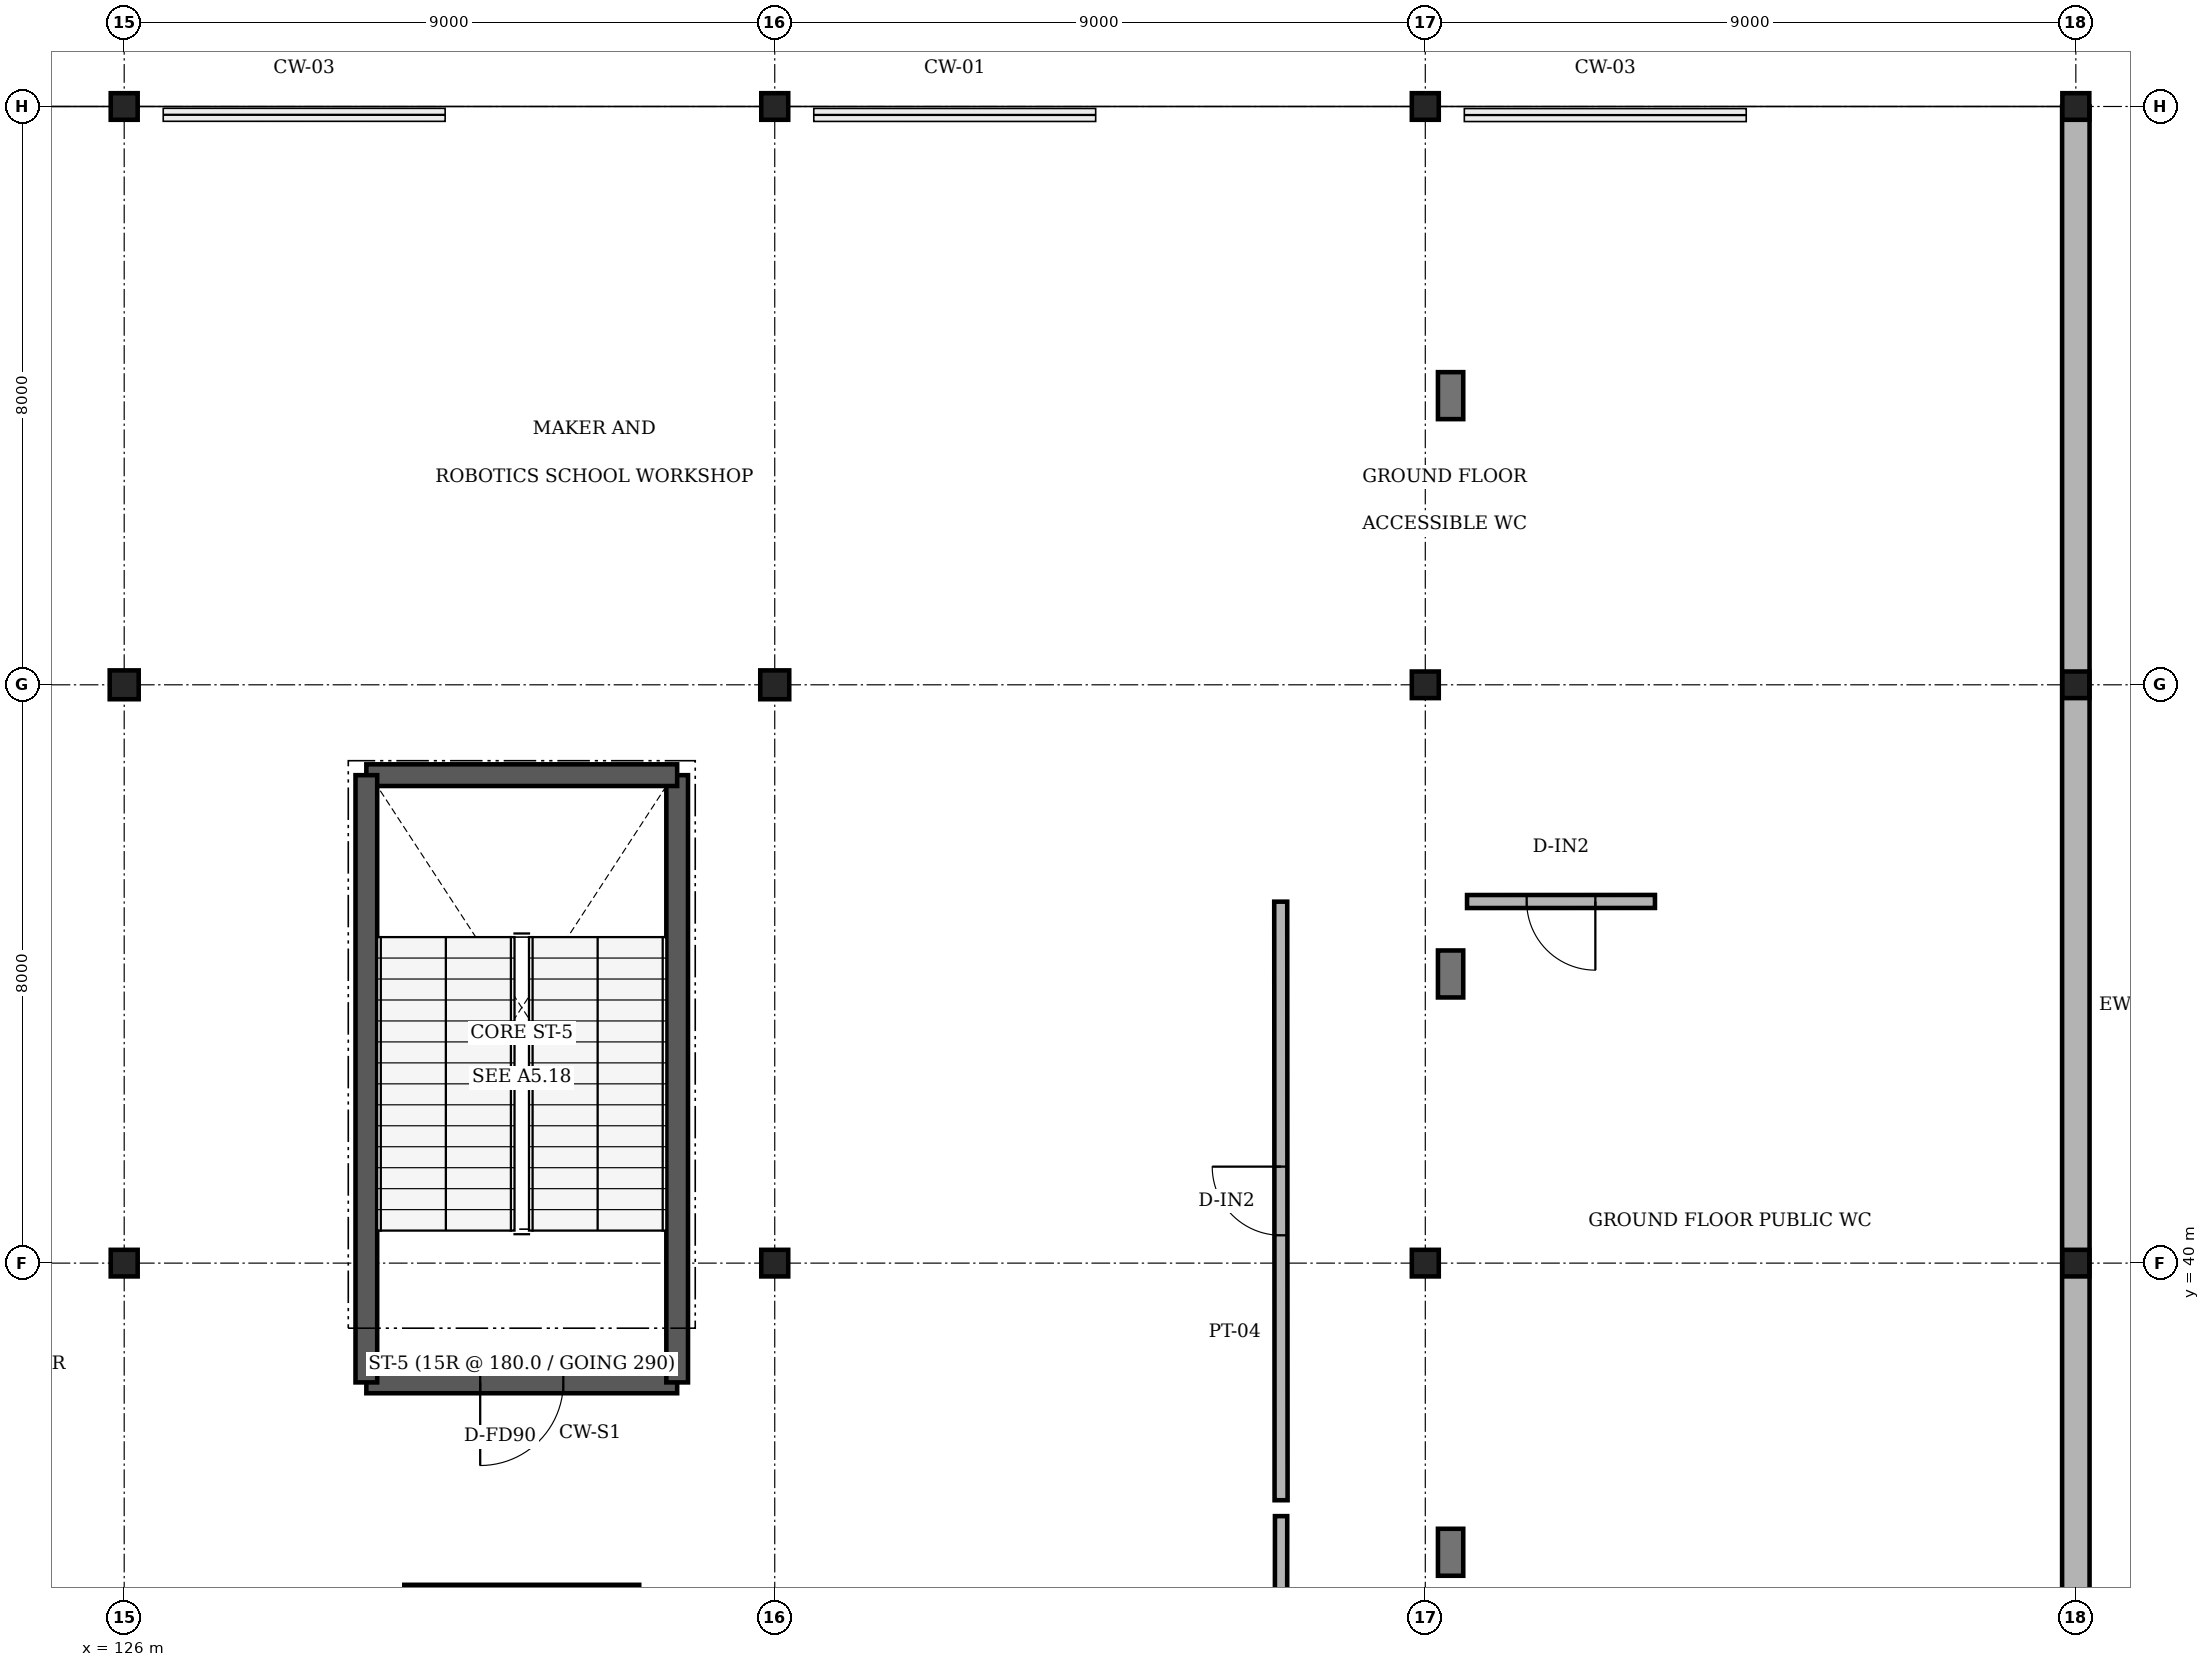
"""IFC4 building model, lengths in metres.
Left out: names, types, materials, properties, quantities, classifications, styles, units other than length and angle.
Written with IfcOpenShell. Run it as: python <this file> out.ifc"""

import sys

from ifc_helpers import new_model, si_unit, direction, frame, frame_2d, origin, origin_2d, place, context, subcontext, project, spatial, rectangle, i_section, extrude, element, fill, save


model = new_model("IFC4")
c1 = context("Model", 3, precision=1e-05, world=origin(), true_north=direction((0.0, 1.0)))
c2 = subcontext(c1, "Body", "Model", "MODEL_VIEW")
j1 = project(units=[si_unit("LENGTHUNIT", "METRE"), si_unit("PLANEANGLEUNIT", "RADIAN")], contexts=[c1])
p1 = place(None, origin())
s1 = spatial("IfcSite", under=j1, at=p1, CompositionType="ELEMENT")
p2 = place(p1, origin())
s2 = spatial("IfcBuilding", under=s1, at=p2, CompositionType="ELEMENT")
p3 = place(p2, origin())
s3 = spatial("IfcBuildingStorey", under=s2, at=p3, CompositionType="ELEMENT", Elevation=0.0)
p4 = place(p3, frame((126.0, 40.0, 0.0), z_axis=(0.0, 0.0, 1.0), x_axis=(1.0, 0.0, 0.0)))
e1 = element("IfcColumn", 1, at=p4, inside=s3, PredefinedType="COLUMN", context=c2, shape_type="SweptSolid", body=[
    extrude(i_section(OverallWidth=0.373, OverallDepth=0.368, WebThickness=0.015, FlangeThickness=0.024, FilletRadius=0.015, at=origin_2d()), origin(), (0.0, 0.0, 1.0), 5.4),
])
p5 = place(p3, frame((126.0, 48.0, 0.0), z_axis=(0.0, 0.0, 1.0), x_axis=(1.0, 0.0, 0.0)))
e2 = element("IfcColumn", 2, at=p5, inside=s3, PredefinedType="COLUMN", context=c2, shape_type="SweptSolid", body=[
    extrude(i_section(OverallWidth=0.401, OverallDepth=0.399, WebThickness=0.025, FlangeThickness=0.04, FilletRadius=0.015, at=origin_2d()), origin(), (0.0, 0.0, 1.0), 5.4),
])
for number, where, z_axis, x_axis in (
    (3, (126.0, 56.0, 0.0), (0.0, 0.0, 1.0), (1.0, 0.0, 0.0)),
    (4, (135.0, 40.0, 0.0), (0.0, 0.0, 1.0), (1.0, 0.0, 0.0)),
):
    element("IfcColumn", number, at=place(p3, frame(where, z_axis=z_axis, x_axis=x_axis)), inside=s3, PredefinedType="COLUMN", context=c2, shape_type="SweptSolid", body=[
        extrude(i_section(OverallWidth=0.373, OverallDepth=0.368, WebThickness=0.015, FlangeThickness=0.024, FilletRadius=0.015, at=origin_2d()), origin(), (0.0, 0.0, 1.0), 5.4),
    ])
p6 = place(p3, frame((135.0, 48.0, 0.0), z_axis=(0.0, 0.0, 1.0), x_axis=(1.0, 0.0, 0.0)))
e5 = element("IfcColumn", 5, at=p6, inside=s3, PredefinedType="COLUMN", context=c2, shape_type="SweptSolid", body=[
    extrude(i_section(OverallWidth=0.401, OverallDepth=0.399, WebThickness=0.025, FlangeThickness=0.04, FilletRadius=0.015, at=origin_2d()), origin(), (0.0, 0.0, 1.0), 5.4),
])
for number, where, z_axis, x_axis in (
    (6, (135.0, 56.0, 0.0), (0.0, 0.0, 1.0), (1.0, 0.0, 0.0)),
    (7, (144.0, 40.0, 0.0), (0.0, 0.0, 1.0), (1.0, 0.0, 0.0)),
    (8, (144.0, 48.0, 0.0), (0.0, 0.0, 1.0), (1.0, 0.0, 0.0)),
    (9, (144.0, 56.0, 0.0), (0.0, 0.0, 1.0), (1.0, 0.0, 0.0)),
    (10, (153.0, 40.0, 0.0), (0.0, 0.0, 1.0), (1.0, 0.0, 0.0)),
    (11, (153.0, 48.0, 0.0), (0.0, 0.0, 1.0), (1.0, 0.0, 0.0)),
    (12, (153.0, 56.0, 0.0), (0.0, 0.0, 1.0), (1.0, 0.0, 0.0)),
):
    element("IfcColumn", number, at=place(p3, frame(where, z_axis=z_axis, x_axis=x_axis)), inside=s3, PredefinedType="COLUMN", context=c2, shape_type="SweptSolid", body=[
        extrude(i_section(OverallWidth=0.373, OverallDepth=0.368, WebThickness=0.015, FlangeThickness=0.024, FilletRadius=0.015, at=origin_2d()), origin(), (0.0, 0.0, 1.0), 5.4),
    ])
for number, where, z_axis, x_axis in (
    (13, (144.35, 36.0, 0.0), (0.0, 0.0, 1.0), (0.0, 1.0, 0.0)),
    (14, (144.35, 44.0, 0.0), (0.0, 0.0, 1.0), (0.0, 1.0, 0.0)),
    (15, (144.35, 52.0, 0.0), (0.0, 0.0, 1.0), (0.0, 1.0, 0.0)),
):
    element("IfcColumn", number, at=place(p3, frame(where, z_axis=z_axis, x_axis=x_axis)), inside=s3, PredefinedType="PILASTER", context=c2, shape_type="SweptSolid", body=[
        extrude(rectangle(XDim=0.65, YDim=0.35, at=origin_2d()), origin(), (0.0, 0.0, 1.0), 5.4),
    ])
p7 = place(p3, frame((153.0, 56.0, 0.0), z_axis=(0.0, 0.0, 1.0), x_axis=(0.0, -1.0, 0.0)))
e16 = element("IfcWall", 16, at=p7, inside=s3, PredefinedType="SOLIDWALL", context=c2, shape_type="SweptSolid", body=[
    extrude(rectangle(XDim=44.4, YDim=0.38, at=frame_2d((22.2, 0.0))), origin(), (0.0, 0.0, 1.0), 4.166),
])
p8 = place(p7, frame((21.2, 0.0, 0.0)))
e17 = element("IfcOpeningElement", 17, at=p8, cuts=e16, PredefinedType="OPENING", context=c2, shape_type="SweptSolid", body=[
    extrude(rectangle(XDim=2.0, YDim=2.4, at=frame_2d((1.0, 1.2))), frame((0.0, 0.2, 0.0), z_axis=(0.0, -1.0, 0.0), x_axis=(1.0, 0.0, 0.0)), (0.0, 0.0, 1.0), 0.4),
])
p9 = place(p3, frame((133.65, 38.35, 0.0), z_axis=(0.0, 0.0, 1.0), x_axis=(-1.0, 0.0, 0.0)))
e18 = element("IfcWall", 18, at=p9, inside=s3, PredefinedType="SOLIDWALL", context=c2, shape_type="SweptSolid", body=[
    extrude(rectangle(XDim=4.3, YDim=0.3, at=frame_2d((2.15, 0.0))), origin(), (0.0, 0.0, 1.0), 5.4),
])
p10 = place(p9, frame((1.575, 0.0, 0.0)))
e19 = element("IfcOpeningElement", 19, at=p10, cuts=e18, PredefinedType="OPENING", context=c2, shape_type="SweptSolid", body=[
    extrude(rectangle(XDim=1.15, YDim=2.2, at=frame_2d((0.575, 1.1))), frame((0.0, 0.16, 0.0), z_axis=(0.0, -1.0, 0.0), x_axis=(1.0, 0.0, 0.0)), (0.0, 0.0, 1.0), 0.32),
])
p11 = place(p3, frame((133.65, 38.35, 0.0), z_axis=(0.0, 0.0, 1.0), x_axis=(0.0, 1.0, 0.0)))
e20 = element("IfcWall", 20, at=p11, inside=s3, PredefinedType="SOLIDWALL", context=c2, shape_type="SweptSolid", body=[
    extrude(rectangle(XDim=8.4, YDim=0.3, at=frame_2d((4.2, 0.0))), origin(), (0.0, 0.0, 1.0), 5.4),
])
p12 = place(p3, frame((133.65, 46.75, 0.0), z_axis=(0.0, 0.0, 1.0), x_axis=(-1.0, 0.0, 0.0)))
e21 = element("IfcWall", 21, at=p12, inside=s3, PredefinedType="SOLIDWALL", context=c2, shape_type="SweptSolid", body=[
    extrude(rectangle(XDim=4.3, YDim=0.3, at=frame_2d((2.15, 0.0))), origin(), (0.0, 0.0, 1.0), 5.4),
])
p13 = place(p3, frame((129.35, 38.35, 0.0), z_axis=(0.0, 0.0, 1.0), x_axis=(0.0, 1.0, 0.0)))
e22 = element("IfcWall", 22, at=p13, inside=s3, PredefinedType="SOLIDWALL", context=c2, shape_type="SweptSolid", body=[
    extrude(rectangle(XDim=8.4, YDim=0.3, at=frame_2d((4.2, 0.0))), origin(), (0.0, 0.0, 1.0), 5.4),
])
p14 = place(p3, frame((133.125, 35.425, 0.0), z_axis=(0.0, 0.0, 1.0), x_axis=(-1.0, 0.0, 0.0)))
e23 = element("IfcWall", 23, at=p14, inside=s3, PredefinedType="SOLIDWALL", context=c2, shape_type="SweptSolid", body=[
    extrude(rectangle(XDim=3.25, YDim=0.25, at=frame_2d((1.625, 0.0))), origin(), (0.0, 0.0, 1.0), 5.4),
])
p15 = place(p3, frame((142.0, 26.005, 0.0), z_axis=(0.0, 0.0, 1.0), x_axis=(0.000465246065, 0.999999891773, 0.0)))
e24 = element("IfcWall", 24, at=p15, inside=s3, PredefinedType="PARTITIONING", context=c2, shape_type="SweptSolid", body=[
    extrude(rectangle(XDim=10.495, YDim=0.17, at=frame_2d((5.248, 0.0))), origin(), (0.0, 0.0, 1.0), 3.15),
])
p16 = place(p15, frame((6.856, 0.0, 0.0)))
e25 = element("IfcOpeningElement", 25, at=p16, cuts=e24, PredefinedType="OPENING", context=c2, shape_type="SweptSolid", body=[
    extrude(rectangle(XDim=1.4, YDim=2.25, at=frame_2d((0.7, 1.125))), frame((0.0, 0.095, 0.0), z_axis=(0.0, -1.0, 0.0), x_axis=(1.0, 0.0, 0.0)), (0.0, 0.0, 1.0), 0.19),
])
p17 = place(p3, frame((142.005, 36.72, 0.0), z_axis=(0.0, 0.0, 1.0), x_axis=(-0.000589709465, 0.999999826121, 0.0)))
e26 = element("IfcWall", 26, at=p17, inside=s3, PredefinedType="PARTITIONING", context=c2, shape_type="SweptSolid", body=[
    extrude(rectangle(XDim=8.28, YDim=0.18, at=frame_2d((4.14, 0.0))), origin(), (0.0, 0.0, 1.0), 3.15),
])
p18 = place(p17, frame((3.665, 0.0, 0.0)))
e27 = element("IfcOpeningElement", 27, at=p18, cuts=e26, PredefinedType="OPENING", context=c2, shape_type="SweptSolid", body=[
    extrude(rectangle(XDim=0.95, YDim=2.15, at=frame_2d((0.475, 1.075))), frame((0.0, 0.1, 0.0), z_axis=(0.0, -1.0, 0.0), x_axis=(1.0, 0.0, 0.0)), (0.0, 0.0, 1.0), 0.2),
])
p19 = place(p3, frame((147.177, 45.003, 0.0), z_axis=(0.0, 0.0, 1.0), x_axis=(-0.999999929467, -0.000375586828, 0.0)))
e28 = element("IfcWall", 28, at=p19, inside=s3, PredefinedType="PARTITIONING", context=c2, shape_type="SweptSolid", body=[
    extrude(rectangle(XDim=2.6, YDim=0.18, at=frame_2d((1.3, 0.0))), origin(), (0.0, 0.0, 1.0), 3.15),
])
p20 = place(p19, frame((0.825, 0.0, 0.0)))
e29 = element("IfcOpeningElement", 29, at=p20, cuts=e28, PredefinedType="OPENING", context=c2, shape_type="SweptSolid", body=[
    extrude(rectangle(XDim=0.95, YDim=2.15, at=frame_2d((0.475, 1.075))), frame((0.0, 0.1, 0.0), z_axis=(0.0, -1.0, 0.0), x_axis=(1.0, 0.0, 0.0)), (0.0, 0.0, 1.0), 0.2),
])
p21 = place(p10, origin())
e30 = element("IfcDoor", 30, at=p21, inside=s3, OperationType="SINGLE_SWING_RIGHT", PredefinedType="DOOR", context=c2, shape_type="SweptSolid", body=[
    extrude(rectangle(XDim=1.15, YDim=2.2, at=frame_2d((0.575, 1.1))), frame((0.0, 0.025, 0.0), z_axis=(0.0, -1.0, 0.0), x_axis=(1.0, 0.0, 0.0)), (0.0, 0.0, 1.0), 0.05),
])
fill(e19, e30)
p22 = place(p18, origin())
e31 = element("IfcDoor", 31, at=p22, inside=s3, OperationType="SINGLE_SWING_RIGHT", PredefinedType="DOOR", context=c2, shape_type="SweptSolid", body=[
    extrude(rectangle(XDim=0.95, YDim=2.15, at=frame_2d((0.475, 1.075))), frame((0.0, 0.025, 0.0), z_axis=(0.0, -1.0, 0.0), x_axis=(1.0, 0.0, 0.0)), (0.0, 0.0, 1.0), 0.05),
])
fill(e27, e31)
p23 = place(p20, origin())
e32 = element("IfcDoor", 32, at=p23, inside=s3, OperationType="SINGLE_SWING_LEFT", PredefinedType="DOOR", context=c2, shape_type="SweptSolid", body=[
    extrude(rectangle(XDim=0.95, YDim=2.15, at=frame_2d((0.475, 1.075))), frame((0.0, 0.025, 0.0), z_axis=(0.0, -1.0, 0.0), x_axis=(1.0, 0.0, 0.0)), (0.0, 0.0, 1.0), 0.05),
])
fill(e29, e32)
save(model, sys.argv[1])
